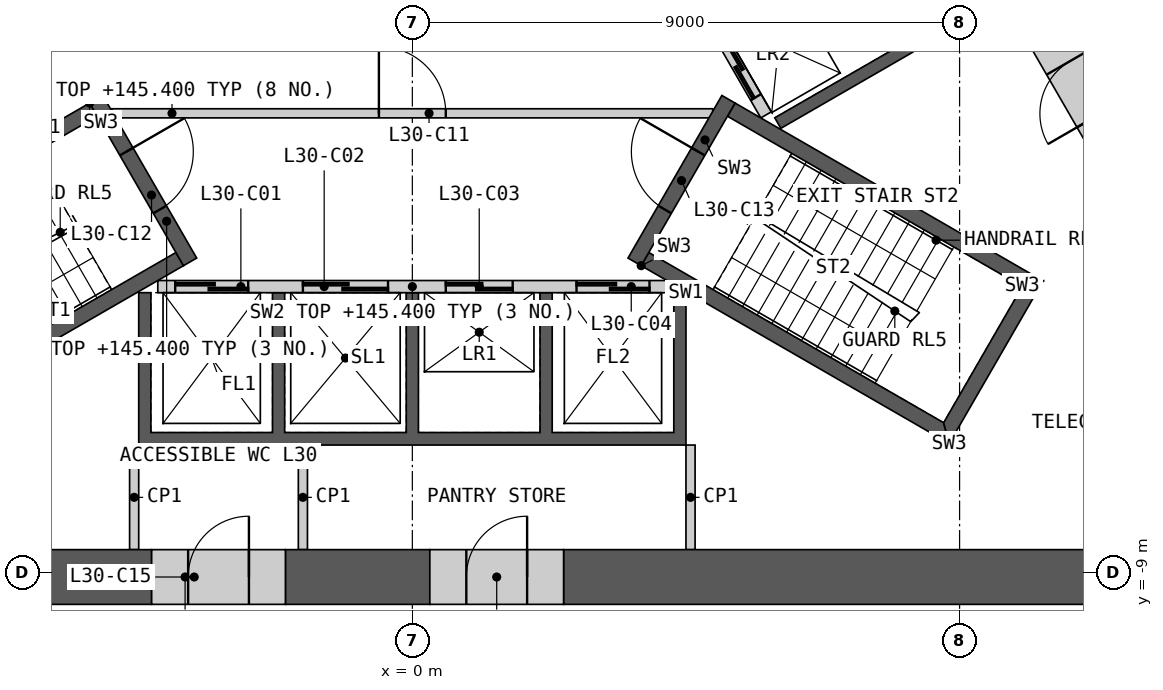
"""IFC4 building model, lengths in metres.
Left out: names, types, materials, properties, quantities, classifications, styles, units other than length and angle.
Written with IfcOpenShell. Run it as: python <this file> out.ifc"""

import sys

from ifc_helpers import new_model, si_unit, direction, frame, frame_2d, origin, place, context, subcontext, project, spatial, polyline, rectangle, outline, extrude, element, fill, save


model = new_model("IFC4")
c1 = context("Model", 3, precision=1e-05, world=origin(), true_north=direction((0.0, 1.0)))
c2 = subcontext(c1, "Body", "Model", "MODEL_VIEW")
j1 = project(units=[si_unit("LENGTHUNIT", "METRE"), si_unit("PLANEANGLEUNIT", "RADIAN")], contexts=[c1])
p1 = place(None, origin())
s1 = spatial("IfcSite", under=j1, at=p1, CompositionType="ELEMENT")
p2 = place(p1, origin())
s2 = spatial("IfcBuilding", under=s1, at=p2, CompositionType="ELEMENT")
p3 = place(p2, frame((0.0, 0.0, 141.6)))
s3 = spatial("IfcBuildingStorey", under=s2, at=p3, CompositionType="ELEMENT", Elevation=141.6)
p4 = place(p3, origin())
e1 = element("IfcWall", 1, at=p4, inside=s3, PredefinedType="SHEAR", context=c2, shape_type="SweptSolid", body=[
    extrude(outline(polyline([(4.5, -4.4), (4.5, -6.906), (-4.5, -6.906), (-4.5, -4.4), (-4.3, -4.4), (-4.3, -6.7), (-2.3, -6.7), (-2.3, -4.4), (-2.1, -4.4), (-2.1, -6.7), (-0.1, -6.7), (-0.1, -4.4), (0.1, -4.4), (0.1, -6.7), (2.1, -6.7), (2.1, -4.4), (2.3, -4.4), (2.3, -6.7), (4.3, -6.7), (4.3, -4.4), (4.5, -4.4)])), origin(), (0.0, 0.0, 1.0), 3.8),
])
p5 = place(p3, frame((-4.187, -4.3, 0.0), z_axis=(0.0, 0.0, 1.0), x_axis=(1.0, 0.0, 0.0)))
e2 = element("IfcWall", 2, at=p5, inside=s3, PredefinedType="SOLIDWALL", context=c2, shape_type="SweptSolid", body=[
    extrude(rectangle(XDim=8.373, YDim=0.2, at=frame_2d((4.187, 0.0))), origin(), (0.0, 0.0, 1.0), 3.8),
])
p6 = place(p5, frame((0.287, 0.0, 0.0)))
e3 = element("IfcOpeningElement", 3, at=p6, cuts=e2, PredefinedType="OPENING", context=c2, shape_type="SweptSolid", body=[
    extrude(rectangle(XDim=1.2, YDim=2.1, at=frame_2d((0.6, 1.05))), frame((0.0, 0.11, 0.0), z_axis=(0.0, -1.0, 0.0), x_axis=(1.0, 0.0, 0.0)), (0.0, 0.0, 1.0), 0.22),
])
p7 = place(p5, frame((2.387, 0.0, 0.0)))
e4 = element("IfcOpeningElement", 4, at=p7, cuts=e2, PredefinedType="OPENING", context=c2, shape_type="SweptSolid", body=[
    extrude(rectangle(XDim=1.4, YDim=2.1, at=frame_2d((0.7, 1.05))), frame((0.0, 0.11, 0.0), z_axis=(0.0, -1.0, 0.0), x_axis=(1.0, 0.0, 0.0)), (0.0, 0.0, 1.0), 0.22),
])
p8 = place(p5, frame((4.737, 0.0, 0.0)))
e5 = element("IfcOpeningElement", 5, at=p8, cuts=e2, PredefinedType="OPENING", context=c2, shape_type="SweptSolid", body=[
    extrude(rectangle(XDim=1.1, YDim=2.1, at=frame_2d((0.55, 1.05))), frame((0.0, 0.11, 0.0), z_axis=(0.0, -1.0, 0.0), x_axis=(1.0, 0.0, 0.0)), (0.0, 0.0, 1.0), 0.22),
])
p9 = place(p5, frame((6.887, 0.0, 0.0)))
e6 = element("IfcOpeningElement", 6, at=p9, cuts=e2, PredefinedType="OPENING", context=c2, shape_type="SweptSolid", body=[
    extrude(rectangle(XDim=1.2, YDim=2.1, at=frame_2d((0.6, 1.05))), frame((0.0, 0.11, 0.0), z_axis=(0.0, -1.0, 0.0), x_axis=(1.0, 0.0, 0.0)), (0.0, 0.0, 1.0), 0.22),
])
p10 = place(p3, origin())
e7 = element("IfcWall", 7, at=p10, inside=s3, PredefinedType="SHEAR", context=c2, shape_type="SweptSolid", body=[
    extrude(outline(polyline([(2.66, 4.192), (4.831, 5.445), (8.231, -0.444), (6.061, -1.697), (5.96, -1.524), (7.952, -0.374), (6.952, 1.358), (4.96, 0.208), (4.861, 0.381), (6.852, 1.531), (5.852, 3.263), (3.861, 2.113), (3.76, 2.287), (5.752, 3.437), (4.752, 5.169), (2.76, 4.019), (2.66, 4.192)])), origin(), (0.0, 0.0, 1.0), 3.8),
])
p11 = place(p3, frame((5.817, -1.476, 0.0), z_axis=(0.0, 0.0, 1.0), x_axis=(-0.500002616675, 0.866023893041, 0.0)))
e8 = element("IfcWall", 8, at=p11, inside=s3, PredefinedType="SOLIDWALL", context=c2, shape_type="SweptSolid", body=[
    extrude(rectangle(XDim=8.373, YDim=0.2, at=frame_2d((4.187, 0.0))), origin(), (0.0, 0.0, 1.0), 3.8),
])
p12 = place(p11, frame((0.337, 0.0, 0.0)))
e9 = element("IfcOpeningElement", 9, at=p12, cuts=e8, PredefinedType="OPENING", context=c2, shape_type="SweptSolid", body=[
    extrude(rectangle(XDim=1.1, YDim=2.1, at=frame_2d((0.55, 1.05))), frame((0.0, 0.11, 0.0), z_axis=(0.0, -1.0, 0.0), x_axis=(1.0, 0.0, 0.0)), (0.0, 0.0, 1.0), 0.22),
])
p13 = place(p11, frame((2.537, 0.0, 0.0)))
e10 = element("IfcOpeningElement", 10, at=p13, cuts=e8, PredefinedType="OPENING", context=c2, shape_type="SweptSolid", body=[
    extrude(rectangle(XDim=1.1, YDim=2.1, at=frame_2d((0.55, 1.05))), frame((0.0, 0.11, 0.0), z_axis=(0.0, -1.0, 0.0), x_axis=(1.0, 0.0, 0.0)), (0.0, 0.0, 1.0), 0.22),
])
p14 = place(p11, frame((4.737, 0.0, 0.0)))
e11 = element("IfcOpeningElement", 11, at=p14, cuts=e8, PredefinedType="OPENING", context=c2, shape_type="SweptSolid", body=[
    extrude(rectangle(XDim=1.1, YDim=2.1, at=frame_2d((0.55, 1.05))), frame((0.0, 0.11, 0.0), z_axis=(0.0, -1.0, 0.0), x_axis=(1.0, 0.0, 0.0)), (0.0, 0.0, 1.0), 0.22),
])
p15 = place(p11, frame((7.037, 0.0, 0.0)))
e12 = element("IfcOpeningElement", 12, at=p15, cuts=e8, PredefinedType="OPENING", context=c2, shape_type="SweptSolid", body=[
    extrude(rectangle(XDim=0.9, YDim=2.1, at=frame_2d((0.45, 1.05))), frame((0.0, 0.11, 0.0), z_axis=(0.0, -1.0, 0.0), x_axis=(1.0, 0.0, 0.0)), (0.0, 0.0, 1.0), 0.22),
])
p16 = place(p3, frame((-4.941, -1.45, 0.0), z_axis=(0.0, 0.0, 1.0), x_axis=(1.0, 0.0, 0.0)))
e13 = element("IfcWall", 13, at=p16, inside=s3, PredefinedType="PARTITIONING", context=c2, shape_type="SweptSolid", body=[
    extrude(rectangle(XDim=9.882, YDim=0.15, at=frame_2d((4.941, 0.0))), origin(), (0.0, 0.0, 1.0), 3.8),
])
p17 = place(p16, frame((4.391, 0.0, 0.0)))
e14 = element("IfcOpeningElement", 14, at=p17, cuts=e13, PredefinedType="OPENING", context=c2, shape_type="SweptSolid", body=[
    extrude(rectangle(XDim=1.1, YDim=2.1, at=frame_2d((0.55, 1.05))), frame((0.0, 0.085, 0.0), z_axis=(0.0, -1.0, 0.0), x_axis=(1.0, 0.0, 0.0)), (0.0, 0.0, 1.0), 0.17),
])
p18 = place(p3, origin())
e15 = element("IfcWall", 15, at=p18, inside=s3, PredefinedType="SHEAR", context=c2, shape_type="SweptSolid", body=[
    extrude(outline(polyline([(-5.307, -1.281), (-10.374, -4.206), (-10.032, -4.298), (-5.182, -1.498), (-5.307, -1.281)])), origin(), (0.0, 0.0, 1.0), 3.8),
])
p19 = place(p3, origin())
e16 = element("IfcWall", 16, at=p19, inside=s3, PredefinedType="SHEAR", context=c2, shape_type="SweptSolid", body=[
    extrude(outline(polyline([(-8.738, -6.539), (-8.83, -6.881), (-3.763, -3.956), (-3.888, -3.739), (-8.738, -6.539)])), origin(), (0.0, 0.0, 1.0), 3.8),
])
p20 = place(p3, frame((-5.199, -1.219, 0.0), z_axis=(0.0, 0.0, 1.0), x_axis=(0.499982516597, -0.866035497597, 0.0)))
e17 = element("IfcWall", 17, at=p20, inside=s3, PredefinedType="SHEAR", context=c2, shape_type="SweptSolid", body=[
    extrude(rectangle(XDim=3.088, YDim=0.25, at=frame_2d((1.544, 0.0))), origin(), (0.0, 0.0, 1.0), 3.8),
])
p21 = place(p20, frame((0.994, 0.0, 0.0)))
e18 = element("IfcOpeningElement", 18, at=p21, cuts=e17, PredefinedType="OPENING", context=c2, shape_type="SweptSolid", body=[
    extrude(rectangle(XDim=1.1, YDim=2.1, at=frame_2d((0.55, 1.05))), frame((0.0, 0.135, 0.0), z_axis=(0.0, -1.0, 0.0), x_axis=(1.0, 0.0, 0.0)), (0.0, 0.0, 1.0), 0.27),
])
p22 = place(p3, origin())
e19 = element("IfcWall", 19, at=p22, inside=s3, PredefinedType="SHEAR", context=c2, shape_type="SweptSolid", body=[
    extrude(outline(polyline([(3.763, -3.956), (8.83, -6.881), (8.738, -6.539), (3.888, -3.739), (3.763, -3.956)])), origin(), (0.0, 0.0, 1.0), 3.8),
])
p23 = place(p3, origin())
e20 = element("IfcWall", 20, at=p23, inside=s3, PredefinedType="SHEAR", context=c2, shape_type="SweptSolid", body=[
    extrude(outline(polyline([(8.83, -6.881), (10.374, -4.206), (10.032, -4.298), (8.738, -6.539), (8.83, -6.881)])), origin(), (0.0, 0.0, 1.0), 3.8),
])
p24 = place(p3, origin())
e21 = element("IfcWall", 21, at=p24, inside=s3, PredefinedType="SHEAR", context=c2, shape_type="SweptSolid", body=[
    extrude(outline(polyline([(10.032, -4.298), (10.374, -4.206), (5.307, -1.281), (5.182, -1.498), (10.032, -4.298)])), origin(), (0.0, 0.0, 1.0), 3.8),
])
p25 = place(p3, frame((3.655, -3.893, 0.0), z_axis=(0.0, 0.0, 1.0), x_axis=(0.499982516597, 0.866035497597, 0.0)))
e22 = element("IfcWall", 22, at=p25, inside=s3, PredefinedType="SHEAR", context=c2, shape_type="SweptSolid", body=[
    extrude(rectangle(XDim=3.088, YDim=0.25, at=frame_2d((1.544, 0.0))), origin(), (0.0, 0.0, 1.0), 3.8),
])
p26 = place(p25, frame((0.994, 0.0, 0.0)))
e23 = element("IfcOpeningElement", 23, at=p26, cuts=e22, PredefinedType="OPENING", context=c2, shape_type="SweptSolid", body=[
    extrude(rectangle(XDim=1.1, YDim=2.1, at=frame_2d((0.55, 1.05))), frame((0.0, 0.135, 0.0), z_axis=(0.0, -1.0, 0.0), x_axis=(1.0, 0.0, 0.0)), (0.0, 0.0, 1.0), 0.27),
])
for number, where, z_axis, x_axis in (
    (24, (4.575, -6.906, 0.0), (0.0, 0.0, 1.0), (0.0, -1.0, 0.0)),
    (25, (-4.575, -6.906, 0.0), (0.0, 0.0, 1.0), (0.0, -1.0, 0.0)),
    (26, (-1.8, -8.626, 0.0), (0.0, 0.0, 1.0), (0.0, 1.0, 0.0)),
):
    element("IfcWall", number, at=place(p3, frame(where, z_axis=z_axis, x_axis=x_axis)), inside=s3, PredefinedType="PARTITIONING", context=c2, shape_type="SweptSolid", body=[
        extrude(rectangle(XDim=1.72, YDim=0.15, at=frame_2d((0.86, 0.0))), origin(), (0.0, 0.0, 1.0), 3.8),
    ])
p27 = place(p3, frame((2.488, -9.076, 0.0), z_axis=(0.0, 0.0, 1.0), x_axis=(1.0, 0.0, 0.0)))
e27 = element("IfcWall", 27, at=p27, inside=s3, PredefinedType="SHEAR", context=c2, shape_type="SweptSolid", body=[
    extrude(rectangle(XDim=12.454, YDim=0.9, at=frame_2d((6.227, 0.0))), origin(), (0.0, 0.0, 1.0), 3.8),
])
p28 = place(p3, frame((-7.115, -9.076, 0.0), z_axis=(0.0, 0.0, 1.0), x_axis=(1.0, 0.0, 0.0)))
e28 = element("IfcWall", 28, at=p28, inside=s3, PredefinedType="SHEAR", context=c2, shape_type="SweptSolid", body=[
    extrude(rectangle(XDim=2.827, YDim=0.9, at=frame_2d((1.414, 0.0))), origin(), (0.0, 0.0, 1.0), 3.8),
])
p29 = place(p3, frame((-2.087, -9.076, 0.0), z_axis=(0.0, 0.0, 1.0), x_axis=(1.0, 0.0, 0.0)))
e29 = element("IfcWall", 29, at=p29, inside=s3, PredefinedType="SHEAR", context=c2, shape_type="SweptSolid", body=[
    extrude(rectangle(XDim=2.375, YDim=0.9, at=frame_2d((1.188, 0.0))), origin(), (0.0, 0.0, 1.0), 3.8),
])
p30 = place(p3, frame((-4.288, -9.076, 0.0), z_axis=(0.0, 0.0, 1.0), x_axis=(1.0, 0.0, 0.0)))
e30 = element("IfcWall", 30, at=p30, inside=s3, PredefinedType="SHEAR", context=c2, shape_type="SweptSolid", body=[
    extrude(rectangle(XDim=2.2, YDim=0.9, at=frame_2d((1.1, 0.0))), origin(), (0.0, 0.0, 1.0), 3.8),
])
p31 = place(p30, frame((0.6, 0.0, 0.0)))
e31 = element("IfcOpeningElement", 31, at=p31, cuts=e30, PredefinedType="OPENING", context=c2, shape_type="SweptSolid", body=[
    extrude(rectangle(XDim=1.0, YDim=2.1, at=frame_2d((0.5, 1.05))), frame((0.0, 0.46, 0.0), z_axis=(0.0, -1.0, 0.0), x_axis=(1.0, 0.0, 0.0)), (0.0, 0.0, 1.0), 0.92),
])
p32 = place(p3, frame((0.288, -9.076, 0.0), z_axis=(0.0, 0.0, 1.0), x_axis=(1.0, 0.0, 0.0)))
e32 = element("IfcWall", 32, at=p32, inside=s3, PredefinedType="SHEAR", context=c2, shape_type="SweptSolid", body=[
    extrude(rectangle(XDim=2.2, YDim=0.9, at=frame_2d((1.1, 0.0))), origin(), (0.0, 0.0, 1.0), 3.8),
])
p33 = place(p32, frame((0.6, 0.0, 0.0)))
e33 = element("IfcOpeningElement", 33, at=p33, cuts=e32, PredefinedType="OPENING", context=c2, shape_type="SweptSolid", body=[
    extrude(rectangle(XDim=1.0, YDim=2.1, at=frame_2d((0.5, 1.05))), frame((0.0, 0.46, 0.0), z_axis=(0.0, -1.0, 0.0), x_axis=(1.0, 0.0, 0.0)), (0.0, 0.0, 1.0), 0.92),
])
p34 = place(p3, frame((11.621, -1.975, 0.0), z_axis=(0.0, 0.0, 1.0), x_axis=(-0.50002983664, 0.866008176907, 0.0)))
e34 = element("IfcWall", 34, at=p34, inside=s3, PredefinedType="SHEAR", context=c2, shape_type="SweptSolid", body=[
    extrude(rectangle(XDim=2.2, YDim=0.9, at=frame_2d((1.1, 0.0))), origin(), (0.0, 0.0, 1.0), 3.8),
])
p35 = place(p34, frame((0.6, 0.0, 0.0)))
e35 = element("IfcOpeningElement", 35, at=p35, cuts=e34, PredefinedType="OPENING", context=c2, shape_type="SweptSolid", body=[
    extrude(rectangle(XDim=1.0, YDim=2.1, at=frame_2d((0.5, 1.05))), frame((0.0, 0.46, 0.0), z_axis=(0.0, -1.0, 0.0), x_axis=(1.0, 0.0, 0.0)), (0.0, 0.0, 1.0), 0.92),
])
p36 = place(p3, frame((10.46, 5.736, 0.0), z_axis=(0.0, 0.0, 1.0), x_axis=(0.500004141693, -0.866023012564, 0.0)))
e36 = element("IfcWall", 36, at=p36, inside=s3, PredefinedType="PARTITIONING", context=c2, shape_type="SweptSolid", body=[
    extrude(rectangle(XDim=9.803, YDim=0.2, at=frame_2d((4.902, 0.0))), origin(), (0.0, 0.0, 1.0), 3.8),
])
p37 = place(p36, frame((6.853, 0.0, 0.0)))
e37 = element("IfcOpeningElement", 37, at=p37, cuts=e36, PredefinedType="OPENING", context=c2, shape_type="SweptSolid", body=[
    extrude(rectangle(XDim=1.0, YDim=2.1, at=frame_2d((0.5, 1.05))), frame((0.0, 0.11, 0.0), z_axis=(0.0, -1.0, 0.0), x_axis=(1.0, 0.0, 0.0)), (0.0, 0.0, 1.0), 0.22),
])
p38 = place(p6, origin())
e38 = element("IfcDoor", 38, at=p38, inside=s3, OperationType="SLIDING_TO_LEFT", PredefinedType="DOOR", context=c2, shape_type="SweptSolid", body=[
    extrude(rectangle(XDim=1.2, YDim=2.1, at=frame_2d((0.6, 1.05))), frame((0.0, 0.025, 0.0), z_axis=(0.0, -1.0, 0.0), x_axis=(1.0, 0.0, 0.0)), (0.0, 0.0, 1.0), 0.05),
])
fill(e3, e38)
p39 = place(p7, origin())
e39 = element("IfcDoor", 39, at=p39, inside=s3, OperationType="SLIDING_TO_LEFT", PredefinedType="DOOR", context=c2, shape_type="SweptSolid", body=[
    extrude(rectangle(XDim=1.4, YDim=2.1, at=frame_2d((0.7, 1.05))), frame((0.0, 0.025, 0.0), z_axis=(0.0, -1.0, 0.0), x_axis=(1.0, 0.0, 0.0)), (0.0, 0.0, 1.0), 0.05),
])
fill(e4, e39)
p40 = place(p8, origin())
e40 = element("IfcDoor", 40, at=p40, inside=s3, OperationType="SLIDING_TO_LEFT", PredefinedType="DOOR", context=c2, shape_type="SweptSolid", body=[
    extrude(rectangle(XDim=1.1, YDim=2.1, at=frame_2d((0.55, 1.05))), frame((0.0, 0.025, 0.0), z_axis=(0.0, -1.0, 0.0), x_axis=(1.0, 0.0, 0.0)), (0.0, 0.0, 1.0), 0.05),
])
fill(e5, e40)
p41 = place(p9, origin())
e41 = element("IfcDoor", 41, at=p41, inside=s3, OperationType="SLIDING_TO_LEFT", PredefinedType="DOOR", context=c2, shape_type="SweptSolid", body=[
    extrude(rectangle(XDim=1.2, YDim=2.1, at=frame_2d((0.6, 1.05))), frame((0.0, 0.025, 0.0), z_axis=(0.0, -1.0, 0.0), x_axis=(1.0, 0.0, 0.0)), (0.0, 0.0, 1.0), 0.05),
])
fill(e6, e41)
p42 = place(p12, origin())
e42 = element("IfcDoor", 42, at=p42, inside=s3, OperationType="SLIDING_TO_LEFT", PredefinedType="DOOR", context=c2, shape_type="SweptSolid", body=[
    extrude(rectangle(XDim=1.1, YDim=2.1, at=frame_2d((0.55, 1.05))), frame((0.0, 0.025, 0.0), z_axis=(0.0, -1.0, 0.0), x_axis=(1.0, 0.0, 0.0)), (0.0, 0.0, 1.0), 0.05),
])
fill(e9, e42)
p43 = place(p17, origin())
e43 = element("IfcDoor", 43, at=p43, inside=s3, OperationType="SINGLE_SWING_LEFT", PredefinedType="DOOR", context=c2, shape_type="SweptSolid", body=[
    extrude(rectangle(XDim=1.1, YDim=2.1, at=frame_2d((0.55, 1.05))), frame((0.0, 0.025, 0.0), z_axis=(0.0, -1.0, 0.0), x_axis=(1.0, 0.0, 0.0)), (0.0, 0.0, 1.0), 0.05),
])
fill(e14, e43)
p44 = place(p21, origin())
e44 = element("IfcDoor", 44, at=p44, inside=s3, OperationType="SINGLE_SWING_LEFT", PredefinedType="DOOR", context=c2, shape_type="SweptSolid", body=[
    extrude(rectangle(XDim=1.1, YDim=2.1, at=frame_2d((0.55, 1.05))), frame((0.0, 0.025, 0.0), z_axis=(0.0, -1.0, 0.0), x_axis=(1.0, 0.0, 0.0)), (0.0, 0.0, 1.0), 0.05),
])
fill(e18, e44)
p45 = place(p26, origin())
e45 = element("IfcDoor", 45, at=p45, inside=s3, OperationType="SINGLE_SWING_RIGHT", PredefinedType="DOOR", context=c2, shape_type="SweptSolid", body=[
    extrude(rectangle(XDim=1.1, YDim=2.1, at=frame_2d((0.55, 1.05))), frame((0.0, 0.025, 0.0), z_axis=(0.0, -1.0, 0.0), x_axis=(1.0, 0.0, 0.0)), (0.0, 0.0, 1.0), 0.05),
])
fill(e23, e45)
p46 = place(p31, origin())
e46 = element("IfcDoor", 46, at=p46, inside=s3, OperationType="SINGLE_SWING_RIGHT", PredefinedType="DOOR", context=c2, shape_type="SweptSolid", body=[
    extrude(rectangle(XDim=1.0, YDim=2.1, at=frame_2d((0.5, 1.05))), frame((0.0, 0.205, 0.0), z_axis=(0.0, -1.0, 0.0), x_axis=(1.0, 0.0, 0.0)), (0.0, 0.0, 1.0), 0.05),
])
fill(e31, e46)
p47 = place(p33, origin())
e47 = element("IfcDoor", 47, at=p47, inside=s3, OperationType="SINGLE_SWING_RIGHT", PredefinedType="DOOR", context=c2, shape_type="SweptSolid", body=[
    extrude(rectangle(XDim=1.0, YDim=2.1, at=frame_2d((0.5, 1.05))), frame((0.0, 0.205, 0.0), z_axis=(0.0, -1.0, 0.0), x_axis=(1.0, 0.0, 0.0)), (0.0, 0.0, 1.0), 0.05),
])
fill(e33, e47)
p48 = place(p35, origin())
e48 = element("IfcDoor", 48, at=p48, inside=s3, OperationType="SINGLE_SWING_LEFT", PredefinedType="DOOR", context=c2, shape_type="SweptSolid", body=[
    extrude(rectangle(XDim=1.0, YDim=2.1, at=frame_2d((0.5, 1.05))), frame((0.0, 0.205, 0.0), z_axis=(0.0, -1.0, 0.0), x_axis=(1.0, 0.0, 0.0)), (0.0, 0.0, 1.0), 0.05),
])
fill(e35, e48)
save(model, sys.argv[1])
